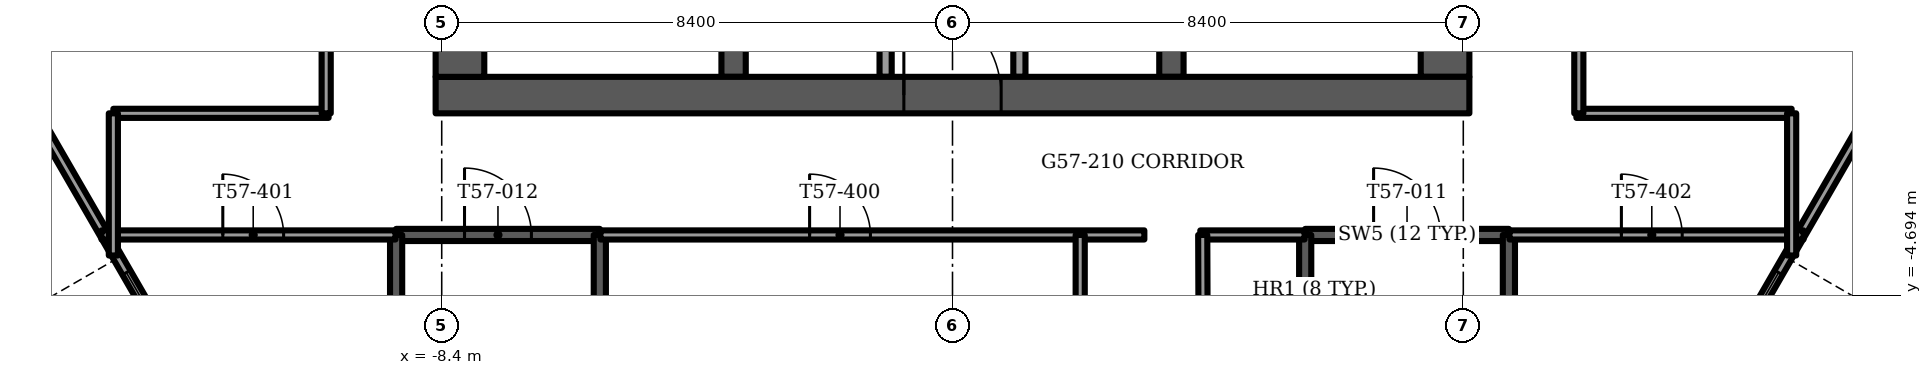
"""IFC4 building model, lengths in metres.
Left out: names, types, materials, properties, quantities, classifications, styles, units other than length and angle.
Written with IfcOpenShell. Run it as: python <this file> out.ifc"""

import sys

from ifc_helpers import new_model, si_unit, direction, frame, frame_2d, origin, place, context, subcontext, project, spatial, rectangle, extrude, element, fill, save


model = new_model("IFC4")
c1 = context("Model", 3, precision=1e-05, world=origin(), true_north=direction((0.0, 1.0)))
c2 = subcontext(c1, "Body", "Model", "MODEL_VIEW")
j1 = project(units=[si_unit("LENGTHUNIT", "METRE"), si_unit("PLANEANGLEUNIT", "RADIAN")], contexts=[c1])
p1 = place(None, origin())
s1 = spatial("IfcSite", under=j1, at=p1, CompositionType="ELEMENT")
p2 = place(p1, origin())
s2 = spatial("IfcBuilding", under=s1, at=p2, CompositionType="ELEMENT")
p3 = place(p2, frame((0.0, 0.0, 229.5)))
s3 = spatial("IfcBuildingStorey", under=s2, at=p3, CompositionType="ELEMENT", Elevation=229.5)
p4 = place(p3, frame((-8.5, -1.4, -0.3), z_axis=(0.0, 0.0, 1.0), x_axis=(1.0, 0.0, 0.0)))
e1 = element("IfcWall", 1, at=p4, inside=s3, PredefinedType="SHEAR", context=c2, shape_type="SweptSolid", body=[
    extrude(rectangle(XDim=17.0, YDim=0.6, at=frame_2d((8.5, 0.0))), origin(), (0.0, 0.0, 1.0), 3.75),
])
p5 = place(p4, frame((7.7, 0.0, 0.0)))
e2 = element("IfcOpeningElement", 2, at=p5, cuts=e1, PredefinedType="OPENING", context=c2, shape_type="SweptSolid", body=[
    extrude(rectangle(XDim=1.6, YDim=2.1, at=frame_2d((0.8, 1.05))), frame((0.0, 0.3, 0.0), z_axis=(0.0, -1.0, 0.0), x_axis=(1.0, 0.0, 0.0)), (0.0, 0.0, 1.0), 0.6),
])
p6 = place(p3, frame((-8.1, -1.1, -0.3), z_axis=(0.0, 0.0, 1.0), x_axis=(0.0, 1.0, 0.0)))
e3 = element("IfcWall", 3, at=p6, inside=s3, PredefinedType="SHEAR", context=c2, shape_type="SweptSolid", body=[
    extrude(rectangle(XDim=10.2, YDim=0.8, at=frame_2d((5.1, 0.0))), origin(), (0.0, 0.0, 1.0), 3.75),
])
p7 = place(p6, frame((8.35, 0.0, 0.0)))
e4 = element("IfcOpeningElement", 4, at=p7, cuts=e3, PredefinedType="OPENING", context=c2, shape_type="SweptSolid", body=[
    extrude(rectangle(XDim=1.1, YDim=2.1, at=frame_2d((0.55, 1.05))), frame((0.0, 0.4, 0.0), z_axis=(0.0, -1.0, 0.0), x_axis=(1.0, 0.0, 0.0)), (0.0, 0.0, 1.0), 0.8),
])
p8 = place(p3, frame((8.1, -1.1, -0.3), z_axis=(0.0, 0.0, 1.0), x_axis=(0.0, 1.0, 0.0)))
e5 = element("IfcWall", 5, at=p8, inside=s3, PredefinedType="SHEAR", context=c2, shape_type="SweptSolid", body=[
    extrude(rectangle(XDim=10.2, YDim=0.8, at=frame_2d((5.1, 0.0))), origin(), (0.0, 0.0, 1.0), 3.75),
])
p9 = place(p8, frame((8.35, 0.0, 0.0)))
e6 = element("IfcOpeningElement", 6, at=p9, cuts=e5, PredefinedType="OPENING", context=c2, shape_type="SweptSolid", body=[
    extrude(rectangle(XDim=1.1, YDim=2.1, at=frame_2d((0.55, 1.05))), frame((0.0, 0.4, 0.0), z_axis=(0.0, -1.0, 0.0), x_axis=(1.0, 0.0, 0.0)), (0.0, 0.0, 1.0), 0.8),
])
for number, where, z_axis, x_axis in (
    (7, (-3.6, -1.1, -0.3), (0.0, 0.0, 1.0), (0.0, 1.0, 0.0)),
    (8, (3.6, -1.1, -0.3), (0.0, 0.0, 1.0), (0.0, 1.0, 0.0)),
):
    element("IfcWall", number, at=place(p3, frame(where, z_axis=z_axis, x_axis=x_axis)), inside=s3, PredefinedType="SHEAR", context=c2, shape_type="SweptSolid", body=[
        extrude(rectangle(XDim=10.2, YDim=0.4, at=frame_2d((5.1, 0.0))), origin(), (0.0, 0.0, 1.0), 3.75),
    ])
p10 = place(p3, frame((-15.583, -0.86, 0.0), z_axis=(0.0, 0.0, 1.0), x_axis=(0.499995050918, -0.866028261119, 0.0)))
e9 = element("IfcWall", 9, at=p10, inside=s3, PredefinedType="SOLIDWALL", context=c2, shape_type="SweptSolid", body=[
    extrude(rectangle(XDim=10.208, YDim=0.15, at=frame_2d((5.104, 0.0))), origin(), (0.0, 0.0, 1.0), 3.45),
])
p11 = place(p10, frame((3.994, 0.0, 0.15)))
e10 = element("IfcOpeningElement", 10, at=p11, cuts=e9, PredefinedType="OPENING", context=c2, shape_type="SweptSolid", body=[
    extrude(rectangle(XDim=0.9, YDim=2.2, at=frame_2d((0.45, 1.1))), frame((0.0, 0.075, 0.0), z_axis=(0.0, -1.0, 0.0), x_axis=(1.0, 0.0, 0.0)), (0.0, 0.0, 1.0), 0.15),
])
p12 = place(p10, frame((5.347, 0.0, 0.15)))
e11 = element("IfcOpeningElement", 11, at=p12, cuts=e9, PredefinedType="OPENING", context=c2, shape_type="SweptSolid", body=[
    extrude(rectangle(XDim=1.4, YDim=2.2, at=frame_2d((0.7, 1.1))), frame((0.0, 0.075, 0.0), z_axis=(0.0, -1.0, 0.0), x_axis=(1.0, 0.0, 0.0)), (0.0, 0.0, 1.0), 0.15),
])
p13 = place(p3, frame((10.479, -9.7, 0.0), z_axis=(0.0, 0.0, 1.0), x_axis=(0.499995050918, 0.866028261119, 0.0)))
e12 = element("IfcWall", 12, at=p13, inside=s3, PredefinedType="SOLIDWALL", context=c2, shape_type="SweptSolid", body=[
    extrude(rectangle(XDim=10.208, YDim=0.15, at=frame_2d((5.104, 0.0))), origin(), (0.0, 0.0, 1.0), 3.45),
])
p14 = place(p13, frame((3.461, 0.0, 0.15)))
e13 = element("IfcOpeningElement", 13, at=p14, cuts=e12, PredefinedType="OPENING", context=c2, shape_type="SweptSolid", body=[
    extrude(rectangle(XDim=0.9, YDim=2.2, at=frame_2d((0.45, 1.1))), frame((0.0, 0.075, 0.0), z_axis=(0.0, -1.0, 0.0), x_axis=(1.0, 0.0, 0.0)), (0.0, 0.0, 1.0), 0.15),
])
p15 = place(p13, frame((4.814, 0.0, 0.15)))
e14 = element("IfcOpeningElement", 14, at=p15, cuts=e12, PredefinedType="OPENING", context=c2, shape_type="SweptSolid", body=[
    extrude(rectangle(XDim=1.4, YDim=2.2, at=frame_2d((0.7, 1.1))), frame((0.0, 0.075, 0.0), z_axis=(0.0, -1.0, 0.0), x_axis=(1.0, 0.0, 0.0)), (0.0, 0.0, 1.0), 0.15),
])
for number, where, z_axis, x_axis in (
    (15, (-1.1, -1.1, 0.0), (0.0, 0.0, 1.0), (0.0, 1.0, 0.0)),
    (16, (1.1, -1.1, 0.0), (0.0, 0.0, 1.0), (0.0, 1.0, 0.0)),
):
    element("IfcWall", number, at=place(p3, frame(where, z_axis=z_axis, x_axis=x_axis)), inside=s3, PredefinedType="PARTITIONING", context=c2, shape_type="SweptSolid", body=[
        extrude(rectangle(XDim=2.9, YDim=0.2, at=frame_2d((1.45, 0.0))), origin(), (0.0, 0.0, 1.0), 3.45),
    ])
p16 = place(p3, frame((5.8, -3.7, -0.3), z_axis=(0.0, 0.0, 1.0), x_axis=(1.0, 0.0, 0.0)))
e17 = element("IfcWall", 17, at=p16, inside=s3, PredefinedType="SOLIDWALL", context=c2, shape_type="SweptSolid", body=[
    extrude(rectangle(XDim=3.35, YDim=0.2, at=frame_2d((1.675, 0.0))), origin(), (0.0, 0.0, 1.0), 3.75),
])
p17 = place(p16, frame((1.125, 0.0, 0.0)))
e18 = element("IfcOpeningElement", 18, at=p17, cuts=e17, PredefinedType="OPENING", context=c2, shape_type="SweptSolid", body=[
    extrude(rectangle(XDim=1.1, YDim=2.1, at=frame_2d((0.55, 1.05))), frame((0.0, 0.1, 0.0), z_axis=(0.0, -1.0, 0.0), x_axis=(1.0, 0.0, 0.0)), (0.0, 0.0, 1.0), 0.2),
])
for number, where, z_axis, x_axis in (
    (19, (5.8, -3.7, -0.3), (0.0, 0.0, 1.0), (0.0, -1.0, 0.0)),
    (20, (9.15, -3.7, -0.3), (0.0, 0.0, 1.0), (0.0, -1.0, 0.0)),
):
    element("IfcWall", number, at=place(p3, frame(where, z_axis=z_axis, x_axis=x_axis)), inside=s3, PredefinedType="SOLIDWALL", context=c2, shape_type="SweptSolid", body=[
        extrude(rectangle(XDim=7.7, YDim=0.2, at=frame_2d((3.85, 0.0))), origin(), (0.0, 0.0, 1.0), 3.75),
    ])
p18 = place(p3, frame((-9.15, -3.7, -0.3), z_axis=(0.0, 0.0, 1.0), x_axis=(1.0, 0.0, 0.0)))
e21 = element("IfcWall", 21, at=p18, inside=s3, PredefinedType="SOLIDWALL", context=c2, shape_type="SweptSolid", body=[
    extrude(rectangle(XDim=3.35, YDim=0.2, at=frame_2d((1.675, 0.0))), origin(), (0.0, 0.0, 1.0), 3.75),
])
p19 = place(p18, frame((1.125, 0.0, 0.0)))
e22 = element("IfcOpeningElement", 22, at=p19, cuts=e21, PredefinedType="OPENING", context=c2, shape_type="SweptSolid", body=[
    extrude(rectangle(XDim=1.1, YDim=2.1, at=frame_2d((0.55, 1.05))), frame((0.0, 0.1, 0.0), z_axis=(0.0, -1.0, 0.0), x_axis=(1.0, 0.0, 0.0)), (0.0, 0.0, 1.0), 0.2),
])
for number, where, z_axis, x_axis in (
    (23, (-9.15, -3.7, -0.3), (0.0, 0.0, 1.0), (0.0, -1.0, 0.0)),
    (24, (-5.8, -3.7, -0.3), (0.0, 0.0, 1.0), (0.0, -1.0, 0.0)),
):
    element("IfcWall", number, at=place(p3, frame(where, z_axis=z_axis, x_axis=x_axis)), inside=s3, PredefinedType="SOLIDWALL", context=c2, shape_type="SweptSolid", body=[
        extrude(rectangle(XDim=7.7, YDim=0.2, at=frame_2d((3.85, 0.0))), origin(), (0.0, 0.0, 1.0), 3.75),
    ])
p20 = place(p3, frame((-13.995, -3.7, 0.0), z_axis=(0.0, 0.0, 1.0), x_axis=(1.0, 0.0, 0.0)))
e25 = element("IfcWall", 25, at=p20, inside=s3, PredefinedType="PARTITIONING", context=c2, shape_type="SweptSolid", body=[
    extrude(rectangle(XDim=4.835, YDim=0.15, at=frame_2d((2.417, 0.0))), origin(), (0.0, 0.0, 1.0), 3.45),
])
p21 = place(p20, frame((1.995, 0.0, 0.0)))
e26 = element("IfcOpeningElement", 26, at=p21, cuts=e25, PredefinedType="OPENING", context=c2, shape_type="SweptSolid", body=[
    extrude(rectangle(XDim=1.0, YDim=2.1, at=frame_2d((0.5, 1.05))), frame((0.0, 0.075, 0.0), z_axis=(0.0, -1.0, 0.0), x_axis=(1.0, 0.0, 0.0)), (0.0, 0.0, 1.0), 0.15),
])
p22 = place(p3, frame((-5.79, -3.7, 0.0), z_axis=(0.0, 0.0, 1.0), x_axis=(1.0, 0.0, 0.0)))
e27 = element("IfcWall", 27, at=p22, inside=s3, PredefinedType="PARTITIONING", context=c2, shape_type="SweptSolid", body=[
    extrude(rectangle(XDim=8.945, YDim=0.15, at=frame_2d((4.473, 0.0))), origin(), (0.0, 0.0, 1.0), 3.45),
])
p23 = place(p22, frame((3.44, 0.0, 0.0)))
e28 = element("IfcOpeningElement", 28, at=p23, cuts=e27, PredefinedType="OPENING", context=c2, shape_type="SweptSolid", body=[
    extrude(rectangle(XDim=1.0, YDim=2.1, at=frame_2d((0.5, 1.05))), frame((0.0, 0.075, 0.0), z_axis=(0.0, -1.0, 0.0), x_axis=(1.0, 0.0, 0.0)), (0.0, 0.0, 1.0), 0.15),
])
p24 = place(p3, frame((4.075, -3.7, 0.0), z_axis=(0.0, 0.0, 1.0), x_axis=(1.0, 0.0, 0.0)))
e29 = element("IfcWall", 29, at=p24, inside=s3, PredefinedType="PARTITIONING", context=c2, shape_type="SweptSolid", body=[
    extrude(rectangle(XDim=1.715, YDim=0.15, at=frame_2d((0.857, 0.0))), origin(), (0.0, 0.0, 1.0), 3.45),
])
p25 = place(p3, frame((9.16, -3.7, 0.0), z_axis=(0.0, 0.0, 1.0), x_axis=(1.0, 0.0, 0.0)))
e30 = element("IfcWall", 30, at=p25, inside=s3, PredefinedType="PARTITIONING", context=c2, shape_type="SweptSolid", body=[
    extrude(rectangle(XDim=4.835, YDim=0.15, at=frame_2d((2.417, 0.0))), origin(), (0.0, 0.0, 1.0), 3.45),
])
p26 = place(p25, frame((1.84, 0.0, 0.0)))
e31 = element("IfcOpeningElement", 31, at=p26, cuts=e30, PredefinedType="OPENING", context=c2, shape_type="SweptSolid", body=[
    extrude(rectangle(XDim=1.0, YDim=2.1, at=frame_2d((0.5, 1.05))), frame((0.0, 0.075, 0.0), z_axis=(0.0, -1.0, 0.0), x_axis=(1.0, 0.0, 0.0)), (0.0, 0.0, 1.0), 0.15),
])
for number, where, z_axis, x_axis in (
    (32, (-13.8, -1.7, 0.0), (0.0, 0.0, 1.0), (1.0, 0.0, 0.0)),
    (33, (10.26, -1.7, 0.0), (0.0, 0.0, 1.0), (1.0, 0.0, 0.0)),
):
    element("IfcWall", number, at=place(p3, frame(where, z_axis=z_axis, x_axis=x_axis)), inside=s3, PredefinedType="PARTITIONING", context=c2, shape_type="SweptSolid", body=[
        extrude(rectangle(XDim=3.54, YDim=0.15, at=frame_2d((1.77, 0.0))), origin(), (0.0, 0.0, 1.0), 3.45),
    ])
p27 = place(p3, frame((13.8, -4.038, 0.0), z_axis=(0.0, 0.0, 1.0), x_axis=(0.0, 1.0, 0.0)))
e34 = element("IfcWall", 34, at=p27, inside=s3, PredefinedType="PARTITIONING", context=c2, shape_type="SweptSolid", body=[
    extrude(rectangle(XDim=2.338, YDim=0.15, at=frame_2d((1.169, 0.0))), origin(), (0.0, 0.0, 1.0), 3.45),
])
p28 = place(p3, frame((10.3, -1.7, 0.0), z_axis=(0.0, 0.0, 1.0), x_axis=(0.0, 1.0, 0.0)))
e35 = element("IfcWall", 35, at=p28, inside=s3, PredefinedType="PARTITIONING", context=c2, shape_type="SweptSolid", body=[
    extrude(rectangle(XDim=9.0, YDim=0.15, at=frame_2d((4.5, 0.0))), origin(), (0.0, 0.0, 1.0), 3.45),
])
p29 = place(p28, frame((3.054, 0.0, 0.0)))
e36 = element("IfcOpeningElement", 36, at=p29, cuts=e35, PredefinedType="OPENING", context=c2, shape_type="SweptSolid", body=[
    extrude(rectangle(XDim=1.0, YDim=2.1, at=frame_2d((0.5, 1.05))), frame((0.0, 0.075, 0.0), z_axis=(0.0, -1.0, 0.0), x_axis=(1.0, 0.0, 0.0)), (0.0, 0.0, 1.0), 0.15),
])
p30 = place(p28, frame((7.2, 0.0, 0.0)))
e37 = element("IfcOpeningElement", 37, at=p30, cuts=e35, PredefinedType="OPENING", context=c2, shape_type="SweptSolid", body=[
    extrude(rectangle(XDim=1.0, YDim=2.1, at=frame_2d((0.5, 1.05))), frame((0.0, 0.075, 0.0), z_axis=(0.0, -1.0, 0.0), x_axis=(1.0, 0.0, 0.0)), (0.0, 0.0, 1.0), 0.15),
])
p31 = place(p3, frame((2.1, -7.7, 0.0), z_axis=(0.0, 0.0, 1.0), x_axis=(0.0, 1.0, 0.0)))
e38 = element("IfcWall", 38, at=p31, inside=s3, PredefinedType="PARTITIONING", context=c2, shape_type="SweptSolid", body=[
    extrude(rectangle(XDim=4.0, YDim=0.15, at=frame_2d((2.0, 0.0))), origin(), (0.0, 0.0, 1.0), 3.45),
])
p32 = place(p3, frame((-10.3, -1.7, 0.0), z_axis=(0.0, 0.0, 1.0), x_axis=(0.0, 1.0, 0.0)))
e39 = element("IfcWall", 39, at=p32, inside=s3, PredefinedType="PARTITIONING", context=c2, shape_type="SweptSolid", body=[
    extrude(rectangle(XDim=9.0, YDim=0.15, at=frame_2d((4.5, 0.0))), origin(), (0.0, 0.0, 1.0), 3.45),
])
p33 = place(p32, frame((2.354, 0.0, 0.0)))
e40 = element("IfcOpeningElement", 40, at=p33, cuts=e39, PredefinedType="OPENING", context=c2, shape_type="SweptSolid", body=[
    extrude(rectangle(XDim=1.0, YDim=2.1, at=frame_2d((0.5, 1.05))), frame((0.0, 0.075, 0.0), z_axis=(0.0, -1.0, 0.0), x_axis=(1.0, 0.0, 0.0)), (0.0, 0.0, 1.0), 0.15),
])
p34 = place(p32, frame((7.2, 0.0, 0.0)))
e41 = element("IfcOpeningElement", 41, at=p34, cuts=e39, PredefinedType="OPENING", context=c2, shape_type="SweptSolid", body=[
    extrude(rectangle(XDim=1.0, YDim=2.1, at=frame_2d((0.5, 1.05))), frame((0.0, 0.075, 0.0), z_axis=(0.0, -1.0, 0.0), x_axis=(1.0, 0.0, 0.0)), (0.0, 0.0, 1.0), 0.15),
])
p35 = place(p3, frame((-13.8, -4.038, 0.0), z_axis=(0.0, 0.0, 1.0), x_axis=(0.0, 1.0, 0.0)))
e42 = element("IfcWall", 42, at=p35, inside=s3, PredefinedType="PARTITIONING", context=c2, shape_type="SweptSolid", body=[
    extrude(rectangle(XDim=2.338, YDim=0.15, at=frame_2d((1.169, 0.0))), origin(), (0.0, 0.0, 1.0), 3.45),
])
p36 = place(p3, frame((4.13, -7.695, 0.0), z_axis=(0.0, 0.0, 1.0), x_axis=(-0.003727669041, 0.999993052218, 0.0)))
e43 = element("IfcWall", 43, at=p36, inside=s3, PredefinedType="PARTITIONING", context=c2, shape_type="SweptSolid", body=[
    extrude(rectangle(XDim=3.995, YDim=0.15, at=frame_2d((1.998, 0.0))), origin(), (0.0, 0.0, 1.0), 3.45),
])
p37 = place(p11, origin())
e44 = element("IfcWindow", 44, at=p37, inside=s3, PartitioningType="SINGLE_PANEL", PredefinedType="WINDOW", context=c2, shape_type="SweptSolid", body=[
    extrude(rectangle(XDim=0.9, YDim=2.2, at=frame_2d((0.45, 1.1))), frame((0.0, 0.03, 0.0), z_axis=(0.0, -1.0, 0.0), x_axis=(1.0, 0.0, 0.0)), (0.0, 0.0, 1.0), 0.06),
])
fill(e10, e44)
p38 = place(p15, origin())
e45 = element("IfcWindow", 45, at=p38, inside=s3, PartitioningType="SINGLE_PANEL", PredefinedType="WINDOW", context=c2, shape_type="SweptSolid", body=[
    extrude(rectangle(XDim=1.4, YDim=2.2, at=frame_2d((0.7, 1.1))), frame((0.0, 0.03, 0.0), z_axis=(0.0, -1.0, 0.0), x_axis=(1.0, 0.0, 0.0)), (0.0, 0.0, 1.0), 0.06),
])
fill(e14, e45)
p39 = place(p5, origin())
e46 = element("IfcDoor", 46, at=p39, inside=s3, OperationType="DOUBLE_DOOR_SINGLE_SWING", PredefinedType="DOOR", context=c2, shape_type="SweptSolid", body=[
    extrude(rectangle(XDim=1.6, YDim=2.1, at=frame_2d((0.8, 1.05))), frame((0.0, 0.025, 0.0), z_axis=(0.0, -1.0, 0.0), x_axis=(1.0, 0.0, 0.0)), (0.0, 0.0, 1.0), 0.05),
])
fill(e2, e46)
p40 = place(p17, origin())
e47 = element("IfcDoor", 47, at=p40, inside=s3, OperationType="SINGLE_SWING_LEFT", PredefinedType="DOOR", context=c2, shape_type="SweptSolid", body=[
    extrude(rectangle(XDim=1.1, YDim=2.1, at=frame_2d((0.55, 1.05))), frame((0.0, 0.025, 0.0), z_axis=(0.0, -1.0, 0.0), x_axis=(1.0, 0.0, 0.0)), (0.0, 0.0, 1.0), 0.05),
])
fill(e18, e47)
p41 = place(p19, origin())
e48 = element("IfcDoor", 48, at=p41, inside=s3, OperationType="SINGLE_SWING_LEFT", PredefinedType="DOOR", context=c2, shape_type="SweptSolid", body=[
    extrude(rectangle(XDim=1.1, YDim=2.1, at=frame_2d((0.55, 1.05))), frame((0.0, 0.025, 0.0), z_axis=(0.0, -1.0, 0.0), x_axis=(1.0, 0.0, 0.0)), (0.0, 0.0, 1.0), 0.05),
])
fill(e22, e48)
p42 = place(p23, origin())
e49 = element("IfcDoor", 49, at=p42, inside=s3, OperationType="SINGLE_SWING_RIGHT", PredefinedType="DOOR", context=c2, shape_type="SweptSolid", body=[
    extrude(rectangle(XDim=1.0, YDim=2.1, at=frame_2d((0.5, 1.05))), frame((0.0, 0.025, 0.0), z_axis=(0.0, -1.0, 0.0), x_axis=(1.0, 0.0, 0.0)), (0.0, 0.0, 1.0), 0.05),
])
fill(e28, e49)
p43 = place(p21, origin())
e50 = element("IfcDoor", 50, at=p43, inside=s3, OperationType="SINGLE_SWING_RIGHT", PredefinedType="DOOR", context=c2, shape_type="SweptSolid", body=[
    extrude(rectangle(XDim=1.0, YDim=2.1, at=frame_2d((0.5, 1.05))), frame((0.0, 0.025, 0.0), z_axis=(0.0, -1.0, 0.0), x_axis=(1.0, 0.0, 0.0)), (0.0, 0.0, 1.0), 0.05),
])
fill(e26, e50)
p44 = place(p26, origin())
e51 = element("IfcDoor", 51, at=p44, inside=s3, OperationType="SINGLE_SWING_LEFT", PredefinedType="DOOR", context=c2, shape_type="SweptSolid", body=[
    extrude(rectangle(XDim=1.0, YDim=2.1, at=frame_2d((0.5, 1.05))), frame((0.0, 0.025, 0.0), z_axis=(0.0, -1.0, 0.0), x_axis=(1.0, 0.0, 0.0)), (0.0, 0.0, 1.0), 0.05),
])
fill(e31, e51)
save(model, sys.argv[1])
